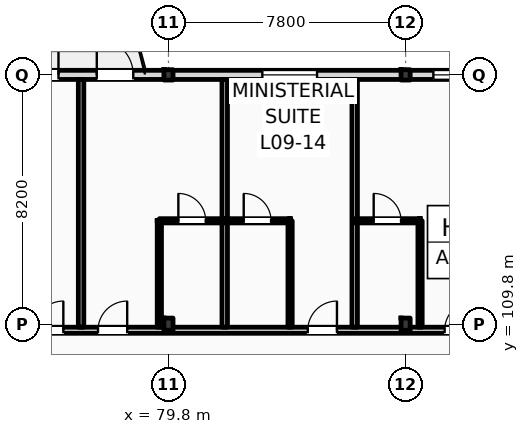
"""IFC4 building model, lengths in metres.
Left out: names, types, materials, properties, quantities, classifications, styles, units other than length and angle.
Written with IfcOpenShell. Run it as: python <this file> out.ifc"""

import sys

from ifc_helpers import new_model, si_unit, direction, frame, frame_2d, origin, origin_2d, place, context, subcontext, project, spatial, rectangle, i_section, extrude, element, fill, save


model = new_model("IFC4")
c1 = context("Model", 3, precision=1e-05, world=origin(), true_north=direction((0.0, 1.0)))
c2 = subcontext(c1, "Body", "Model", "MODEL_VIEW")
j1 = project(units=[si_unit("LENGTHUNIT", "METRE"), si_unit("PLANEANGLEUNIT", "RADIAN")], contexts=[c1])
p1 = place(None, origin())
s1 = spatial("IfcSite", under=j1, at=p1, CompositionType="ELEMENT")
p2 = place(p1, origin())
s2 = spatial("IfcBuilding", under=s1, at=p2, CompositionType="ELEMENT")
p3 = place(p2, frame((0.0, 0.0, 39.0)))
s3 = spatial("IfcBuildingStorey", under=s2, at=p3, CompositionType="ELEMENT", Elevation=39.0)
p4 = place(p3, frame((79.8, 109.8, 0.0), z_axis=(0.0, 0.0, 1.0), x_axis=(1.0, 0.0, 0.0)))
e1 = element("IfcColumn", 1, at=p4, inside=s3, PredefinedType="COLUMN", context=c2, shape_type="SweptSolid", body=[
    extrude(i_section(OverallWidth=0.3, OverallDepth=0.4, WebThickness=0.013, FlangeThickness=0.024, FilletRadius=0.027, at=origin_2d()), origin(), (0.0, 0.0, 1.0), 3.6),
])
p5 = place(p3, frame((79.8, 118.0, 0.0), z_axis=(0.0, 0.0, 1.0), x_axis=(1.0, 0.0, 0.0)))
e2 = element("IfcColumn", 2, at=p5, inside=s3, PredefinedType="COLUMN", context=c2, shape_type="SweptSolid", body=[
    extrude(i_section(OverallWidth=0.3, OverallDepth=0.34, WebThickness=0.012, FlangeThickness=0.021, FilletRadius=0.027, at=origin_2d()), origin(), (0.0, 0.0, 1.0), 3.6),
])
p6 = place(p3, frame((87.6, 109.8, 0.0), z_axis=(0.0, 0.0, 1.0), x_axis=(1.0, 0.0, 0.0)))
e3 = element("IfcColumn", 3, at=p6, inside=s3, PredefinedType="COLUMN", context=c2, shape_type="SweptSolid", body=[
    extrude(i_section(OverallWidth=0.3, OverallDepth=0.4, WebThickness=0.013, FlangeThickness=0.024, FilletRadius=0.027, at=origin_2d()), origin(), (0.0, 0.0, 1.0), 3.6),
])
p7 = place(p3, frame((87.6, 118.0, 0.0), z_axis=(0.0, 0.0, 1.0), x_axis=(1.0, 0.0, 0.0)))
e4 = element("IfcColumn", 4, at=p7, inside=s3, PredefinedType="COLUMN", context=c2, shape_type="SweptSolid", body=[
    extrude(i_section(OverallWidth=0.3, OverallDepth=0.34, WebThickness=0.012, FlangeThickness=0.021, FilletRadius=0.027, at=origin_2d()), origin(), (0.0, 0.0, 1.0), 3.6),
])
p8 = place(p3, frame((22.5, 118.0, 0.0), z_axis=(0.0, 0.0, 1.0), x_axis=(1.0, 0.0, 0.0)))
e5 = element("IfcWall", 5, at=p8, inside=s3, PredefinedType="STANDARD", context=c2, shape_type="SweptSolid", body=[
    extrude(rectangle(XDim=72.9, YDim=0.3, at=frame_2d((36.45, 0.0))), origin(), (0.0, 0.0, 1.0), 2.92),
])
p9 = place(p8, frame((3.6, 0.0, 0.9)))
e6 = element("IfcOpeningElement", 6, at=p9, cuts=e5, PredefinedType="OPENING", context=c2, shape_type="SweptSolid", body=[
    extrude(rectangle(XDim=1.1, YDim=1.6, at=frame_2d((0.55, 0.8))), frame((0.0, 0.16, 0.0), z_axis=(0.0, -1.0, 0.0), x_axis=(1.0, 0.0, 0.0)), (0.0, 0.0, 1.0), 0.32),
])
p10 = place(p8, frame((6.688, 0.0, 0.0)))
e7 = element("IfcOpeningElement", 7, at=p10, cuts=e5, PredefinedType="OPENING", context=c2, shape_type="SweptSolid", body=[
    extrude(rectangle(XDim=1.2, YDim=2.25, at=frame_2d((0.6, 1.125))), frame((0.0, 0.16, 0.0), z_axis=(0.0, -1.0, 0.0), x_axis=(1.0, 0.0, 0.0)), (0.0, 0.0, 1.0), 0.32),
])
p11 = place(p8, frame((11.388, 0.0, 0.9)))
e8 = element("IfcOpeningElement", 8, at=p11, cuts=e5, PredefinedType="OPENING", context=c2, shape_type="SweptSolid", body=[
    extrude(rectangle(XDim=1.6, YDim=1.75, at=frame_2d((0.8, 0.875))), frame((0.0, 0.16, 0.0), z_axis=(0.0, -1.0, 0.0), x_axis=(1.0, 0.0, 0.0)), (0.0, 0.0, 1.0), 0.32),
])
p12 = place(p8, frame((15.413, 0.0, 0.9)))
e9 = element("IfcOpeningElement", 9, at=p12, cuts=e5, PredefinedType="OPENING", context=c2, shape_type="SweptSolid", body=[
    extrude(rectangle(XDim=1.75, YDim=1.84, at=frame_2d((0.875, 0.92))), frame((0.0, 0.16, 0.0), z_axis=(0.0, -1.0, 0.0), x_axis=(1.0, 0.0, 0.0)), (0.0, 0.0, 1.0), 0.32),
])
p13 = place(p8, frame((21.245, 0.0, 0.0)))
e10 = element("IfcOpeningElement", 10, at=p13, cuts=e5, PredefinedType="OPENING", context=c2, shape_type="SweptSolid", body=[
    extrude(rectangle(XDim=1.2, YDim=2.25, at=frame_2d((0.6, 1.125))), frame((0.0, 0.16, 0.0), z_axis=(0.0, -1.0, 0.0), x_axis=(1.0, 0.0, 0.0)), (0.0, 0.0, 1.0), 0.32),
])
p14 = place(p8, frame((23.705, 0.0, 0.0)))
e11 = element("IfcOpeningElement", 11, at=p14, cuts=e5, PredefinedType="OPENING", context=c2, shape_type="SweptSolid", body=[
    extrude(rectangle(XDim=1.2, YDim=2.25, at=frame_2d((0.6, 1.125))), frame((0.0, 0.16, 0.0), z_axis=(0.0, -1.0, 0.0), x_axis=(1.0, 0.0, 0.0)), (0.0, 0.0, 1.0), 0.32),
])
p15 = place(p8, frame((28.488, 0.0, 0.9)))
e12 = element("IfcOpeningElement", 12, at=p15, cuts=e5, PredefinedType="OPENING", context=c2, shape_type="SweptSolid", body=[
    extrude(rectangle(XDim=2.6, YDim=1.84, at=frame_2d((1.3, 0.92))), frame((0.0, 0.16, 0.0), z_axis=(0.0, -1.0, 0.0), x_axis=(1.0, 0.0, 0.0)), (0.0, 0.0, 1.0), 0.32),
])
p16 = place(p8, frame((34.76, 0.0, 0.9)))
e13 = element("IfcOpeningElement", 13, at=p16, cuts=e5, PredefinedType="OPENING", context=c2, shape_type="SweptSolid", body=[
    extrude(rectangle(XDim=1.1, YDim=1.84, at=frame_2d((0.55, 0.92))), frame((0.0, 0.16, 0.0), z_axis=(0.0, -1.0, 0.0), x_axis=(1.0, 0.0, 0.0)), (0.0, 0.0, 1.0), 0.32),
])
p17 = place(p8, frame((38.143, 0.0, 0.0)))
e14 = element("IfcOpeningElement", 14, at=p17, cuts=e5, PredefinedType="OPENING", context=c2, shape_type="SweptSolid", body=[
    extrude(rectangle(XDim=1.2, YDim=2.25, at=frame_2d((0.6, 1.125))), frame((0.0, 0.16, 0.0), z_axis=(0.0, -1.0, 0.0), x_axis=(1.0, 0.0, 0.0)), (0.0, 0.0, 1.0), 0.32),
])
p18 = place(p8, frame((42.687, 0.0, 0.9)))
e15 = element("IfcOpeningElement", 15, at=p18, cuts=e5, PredefinedType="OPENING", context=c2, shape_type="SweptSolid", body=[
    extrude(rectangle(XDim=1.2, YDim=1.8, at=frame_2d((0.6, 0.9))), frame((0.0, 0.16, 0.0), z_axis=(0.0, -1.0, 0.0), x_axis=(1.0, 0.0, 0.0)), (0.0, 0.0, 1.0), 0.32),
])
p19 = place(p8, frame((47.112, 0.0, 0.9)))
e16 = element("IfcOpeningElement", 16, at=p19, cuts=e5, PredefinedType="OPENING", context=c2, shape_type="SweptSolid", body=[
    extrude(rectangle(XDim=1.35, YDim=1.84, at=frame_2d((0.675, 0.92))), frame((0.0, 0.16, 0.0), z_axis=(0.0, -1.0, 0.0), x_axis=(1.0, 0.0, 0.0)), (0.0, 0.0, 1.0), 0.32),
])
p20 = place(p8, frame((52.482, 0.0, 0.0)))
e17 = element("IfcOpeningElement", 17, at=p20, cuts=e5, PredefinedType="OPENING", context=c2, shape_type="SweptSolid", body=[
    extrude(rectangle(XDim=1.2, YDim=2.25, at=frame_2d((0.6, 1.125))), frame((0.0, 0.16, 0.0), z_axis=(0.0, -1.0, 0.0), x_axis=(1.0, 0.0, 0.0)), (0.0, 0.0, 1.0), 0.32),
])
p21 = place(p8, frame((54.942, 0.0, 0.0)))
e18 = element("IfcOpeningElement", 18, at=p21, cuts=e5, PredefinedType="OPENING", context=c2, shape_type="SweptSolid", body=[
    extrude(rectangle(XDim=1.2, YDim=2.25, at=frame_2d((0.6, 1.125))), frame((0.0, 0.16, 0.0), z_axis=(0.0, -1.0, 0.0), x_axis=(1.0, 0.0, 0.0)), (0.0, 0.0, 1.0), 0.32),
])
p22 = place(p8, frame((60.387, 0.0, 0.9)))
e19 = element("IfcOpeningElement", 19, at=p22, cuts=e5, PredefinedType="OPENING", context=c2, shape_type="SweptSolid", body=[
    extrude(rectangle(XDim=1.8, YDim=1.84, at=frame_2d((0.9, 0.92))), frame((0.0, 0.16, 0.0), z_axis=(0.0, -1.0, 0.0), x_axis=(1.0, 0.0, 0.0)), (0.0, 0.0, 1.0), 0.32),
])
p23 = place(p8, frame((66.013, 0.0, 0.9)))
e20 = element("IfcOpeningElement", 20, at=p23, cuts=e5, PredefinedType="OPENING", context=c2, shape_type="SweptSolid", body=[
    extrude(rectangle(XDim=1.35, YDim=1.84, at=frame_2d((0.675, 0.92))), frame((0.0, 0.16, 0.0), z_axis=(0.0, -1.0, 0.0), x_axis=(1.0, 0.0, 0.0)), (0.0, 0.0, 1.0), 0.32),
])
p24 = place(p8, frame((69.275, 0.0, 0.9)))
e21 = element("IfcOpeningElement", 21, at=p24, cuts=e5, PredefinedType="OPENING", context=c2, shape_type="SweptSolid", body=[
    extrude(rectangle(XDim=2.1, YDim=1.84, at=frame_2d((1.05, 0.92))), frame((0.0, 0.16, 0.0), z_axis=(0.0, -1.0, 0.0), x_axis=(1.0, 0.0, 0.0)), (0.0, 0.0, 1.0), 0.32),
])
p25 = place(p3, frame((10.65, 109.6, 0.0), z_axis=(0.0, 0.0, 1.0), x_axis=(1.0, 0.0, 0.0)))
e22 = element("IfcWall", 22, at=p25, inside=s3, PredefinedType="PARTITIONING", context=c2, shape_type="SweptSolid", body=[
    extrude(rectangle(XDim=84.61, YDim=0.2, at=frame_2d((42.305, 0.0))), origin(), (0.0, 0.0, 1.0), 2.82),
])
p26 = place(p25, frame((15.49, 0.0, 0.0)))
e23 = element("IfcOpeningElement", 23, at=p26, cuts=e22, PredefinedType="OPENING", context=c2, shape_type="SweptSolid", body=[
    extrude(rectangle(XDim=1.02, YDim=2.2, at=frame_2d((0.51, 1.1))), frame((0.0, 0.11, 0.0), z_axis=(0.0, -1.0, 0.0), x_axis=(1.0, 0.0, 0.0)), (0.0, 0.0, 1.0), 0.22),
])
p27 = place(p25, frame((19.703, 0.0, 0.0)))
e24 = element("IfcOpeningElement", 24, at=p27, cuts=e22, PredefinedType="OPENING", context=c2, shape_type="SweptSolid", body=[
    extrude(rectangle(XDim=1.02, YDim=2.2, at=frame_2d((0.51, 1.1))), frame((0.0, 0.11, 0.0), z_axis=(0.0, -1.0, 0.0), x_axis=(1.0, 0.0, 0.0)), (0.0, 0.0, 1.0), 0.22),
])
p28 = place(p25, frame((24.203, 0.0, 0.0)))
e25 = element("IfcOpeningElement", 25, at=p28, cuts=e22, PredefinedType="OPENING", context=c2, shape_type="SweptSolid", body=[
    extrude(rectangle(XDim=1.02, YDim=2.2, at=frame_2d((0.51, 1.1))), frame((0.0, 0.11, 0.0), z_axis=(0.0, -1.0, 0.0), x_axis=(1.0, 0.0, 0.0)), (0.0, 0.0, 1.0), 0.22),
])
p29 = place(p25, frame((26.552, 0.0, 0.0)))
e26 = element("IfcOpeningElement", 26, at=p29, cuts=e22, PredefinedType="OPENING", context=c2, shape_type="SweptSolid", body=[
    extrude(rectangle(XDim=1.02, YDim=2.2, at=frame_2d((0.51, 1.1))), frame((0.0, 0.11, 0.0), z_axis=(0.0, -1.0, 0.0), x_axis=(1.0, 0.0, 0.0)), (0.0, 0.0, 1.0), 0.22),
])
p30 = place(p25, frame((33.233, 0.0, 0.0)))
e27 = element("IfcOpeningElement", 27, at=p30, cuts=e22, PredefinedType="OPENING", context=c2, shape_type="SweptSolid", body=[
    extrude(rectangle(XDim=0.96, YDim=2.2, at=frame_2d((0.48, 1.1))), frame((0.0, 0.11, 0.0), z_axis=(0.0, -1.0, 0.0), x_axis=(1.0, 0.0, 0.0)), (0.0, 0.0, 1.0), 0.22),
])
p31 = place(p25, frame((35.583, 0.0, 0.0)))
e28 = element("IfcOpeningElement", 28, at=p31, cuts=e22, PredefinedType="OPENING", context=c2, shape_type="SweptSolid", body=[
    extrude(rectangle(XDim=0.96, YDim=2.2, at=frame_2d((0.48, 1.1))), frame((0.0, 0.11, 0.0), z_axis=(0.0, -1.0, 0.0), x_axis=(1.0, 0.0, 0.0)), (0.0, 0.0, 1.0), 0.22),
])
p32 = place(p25, frame((42.233, 0.0, 0.0)))
e29 = element("IfcOpeningElement", 29, at=p32, cuts=e22, PredefinedType="OPENING", context=c2, shape_type="SweptSolid", body=[
    extrude(rectangle(XDim=0.96, YDim=2.2, at=frame_2d((0.48, 1.1))), frame((0.0, 0.11, 0.0), z_axis=(0.0, -1.0, 0.0), x_axis=(1.0, 0.0, 0.0)), (0.0, 0.0, 1.0), 0.22),
])
p33 = place(p25, frame((46.983, 0.0, 0.0)))
e30 = element("IfcOpeningElement", 30, at=p33, cuts=e22, PredefinedType="OPENING", context=c2, shape_type="SweptSolid", body=[
    extrude(rectangle(XDim=0.96, YDim=2.2, at=frame_2d((0.48, 1.1))), frame((0.0, 0.11, 0.0), z_axis=(0.0, -1.0, 0.0), x_axis=(1.0, 0.0, 0.0)), (0.0, 0.0, 1.0), 0.22),
])
p34 = place(p25, frame((51.233, 0.0, 0.0)))
e31 = element("IfcOpeningElement", 31, at=p34, cuts=e22, PredefinedType="OPENING", context=c2, shape_type="SweptSolid", body=[
    extrude(rectangle(XDim=0.96, YDim=2.2, at=frame_2d((0.48, 1.1))), frame((0.0, 0.11, 0.0), z_axis=(0.0, -1.0, 0.0), x_axis=(1.0, 0.0, 0.0)), (0.0, 0.0, 1.0), 0.22),
])
p35 = place(p25, frame((55.733, 0.0, 0.0)))
e32 = element("IfcOpeningElement", 32, at=p35, cuts=e22, PredefinedType="OPENING", context=c2, shape_type="SweptSolid", body=[
    extrude(rectangle(XDim=0.96, YDim=2.2, at=frame_2d((0.48, 1.1))), frame((0.0, 0.11, 0.0), z_axis=(0.0, -1.0, 0.0), x_axis=(1.0, 0.0, 0.0)), (0.0, 0.0, 1.0), 0.22),
])
p36 = place(p25, frame((58.083, 0.0, 0.0)))
e33 = element("IfcOpeningElement", 33, at=p36, cuts=e22, PredefinedType="OPENING", context=c2, shape_type="SweptSolid", body=[
    extrude(rectangle(XDim=0.96, YDim=2.2, at=frame_2d((0.48, 1.1))), frame((0.0, 0.11, 0.0), z_axis=(0.0, -1.0, 0.0), x_axis=(1.0, 0.0, 0.0)), (0.0, 0.0, 1.0), 0.22),
])
p37 = place(p25, frame((64.732, 0.0, 0.0)))
e34 = element("IfcOpeningElement", 34, at=p37, cuts=e22, PredefinedType="OPENING", context=c2, shape_type="SweptSolid", body=[
    extrude(rectangle(XDim=0.96, YDim=2.2, at=frame_2d((0.48, 1.1))), frame((0.0, 0.11, 0.0), z_axis=(0.0, -1.0, 0.0), x_axis=(1.0, 0.0, 0.0)), (0.0, 0.0, 1.0), 0.22),
])
p38 = place(p25, frame((66.832, 0.0, 0.0)))
e35 = element("IfcOpeningElement", 35, at=p38, cuts=e22, PredefinedType="OPENING", context=c2, shape_type="SweptSolid", body=[
    extrude(rectangle(XDim=0.96, YDim=2.2, at=frame_2d((0.48, 1.1))), frame((0.0, 0.11, 0.0), z_axis=(0.0, -1.0, 0.0), x_axis=(1.0, 0.0, 0.0)), (0.0, 0.0, 1.0), 0.22),
])
p39 = place(p25, frame((73.732, 0.0, 0.0)))
e36 = element("IfcOpeningElement", 36, at=p39, cuts=e22, PredefinedType="OPENING", context=c2, shape_type="SweptSolid", body=[
    extrude(rectangle(XDim=0.96, YDim=2.2, at=frame_2d((0.48, 1.1))), frame((0.0, 0.11, 0.0), z_axis=(0.0, -1.0, 0.0), x_axis=(1.0, 0.0, 0.0)), (0.0, 0.0, 1.0), 0.22),
])
p40 = place(p25, frame((78.233, 0.0, 0.0)))
e37 = element("IfcOpeningElement", 37, at=p40, cuts=e22, PredefinedType="OPENING", context=c2, shape_type="SweptSolid", body=[
    extrude(rectangle(XDim=0.96, YDim=2.2, at=frame_2d((0.48, 1.1))), frame((0.0, 0.11, 0.0), z_axis=(0.0, -1.0, 0.0), x_axis=(1.0, 0.0, 0.0)), (0.0, 0.0, 1.0), 0.22),
])
p41 = place(p25, frame((80.62, 0.0, 0.0)))
e38 = element("IfcOpeningElement", 38, at=p41, cuts=e22, PredefinedType="OPENING", context=c2, shape_type="SweptSolid", body=[
    extrude(rectangle(XDim=0.96, YDim=2.2, at=frame_2d((0.48, 1.1))), frame((0.0, 0.11, 0.0), z_axis=(0.0, -1.0, 0.0), x_axis=(1.0, 0.0, 0.0)), (0.0, 0.0, 1.0), 0.22),
])
p42 = place(p25, frame((2.716, 0.0, 0.0)))
e39 = element("IfcOpeningElement", 39, at=p42, cuts=e22, PredefinedType="OPENING", context=c2, shape_type="SweptSolid", body=[
    extrude(rectangle(XDim=1.35, YDim=2.25, at=frame_2d((0.675, 1.125))), frame((0.0, 0.11, 0.0), z_axis=(0.0, -1.0, 0.0), x_axis=(1.0, 0.0, 0.0)), (0.0, 0.0, 1.0), 0.22),
])
p43 = place(p25, frame((6.65, 0.0, 0.0)))
e40 = element("IfcOpeningElement", 40, at=p43, cuts=e22, PredefinedType="OPENING", context=c2, shape_type="SweptSolid", body=[
    extrude(rectangle(XDim=1.35, YDim=2.25, at=frame_2d((0.675, 1.125))), frame((0.0, 0.11, 0.0), z_axis=(0.0, -1.0, 0.0), x_axis=(1.0, 0.0, 0.0)), (0.0, 0.0, 1.0), 0.22),
])
p44 = place(p25, frame((10.583, 0.0, 0.0)))
e41 = element("IfcOpeningElement", 41, at=p44, cuts=e22, PredefinedType="OPENING", context=c2, shape_type="SweptSolid", body=[
    extrude(rectangle(XDim=1.35, YDim=2.25, at=frame_2d((0.675, 1.125))), frame((0.0, 0.11, 0.0), z_axis=(0.0, -1.0, 0.0), x_axis=(1.0, 0.0, 0.0)), (0.0, 0.0, 1.0), 0.22),
])
for number, where, z_axis, x_axis in (
    (42, (76.925, 109.7, 0.0), (0.0, 0.0, 1.0), (0.0, 1.0, 0.0)),
    (43, (81.65, 109.7, 0.0), (0.0, 0.0, 1.0), (0.0, 1.0, 0.0)),
):
    element("IfcWall", number, at=place(p3, frame(where, z_axis=z_axis, x_axis=x_axis)), inside=s3, PredefinedType="PARTITIONING", context=c2, shape_type="SweptSolid", body=[
        extrude(rectangle(XDim=8.15, YDim=0.18, at=frame_2d((4.075, 0.0))), origin(), (0.0, 0.0, 1.0), 3.38),
    ])
p45 = place(p3, frame((79.5, 109.7, 0.0), z_axis=(0.0, 0.0, 1.0), x_axis=(0.0, 1.0, 0.0)))
e44 = element("IfcWall", 44, at=p45, inside=s3, PredefinedType="PARTITIONING", context=c2, shape_type="SweptSolid", body=[
    extrude(rectangle(XDim=3.5, YDim=0.14, at=frame_2d((1.75, 0.0))), origin(), (0.0, 0.0, 1.0), 3.38),
])
p46 = place(p3, frame((79.5, 113.2, 0.0), z_axis=(0.0, 0.0, 1.0), x_axis=(1.0, 0.0, 0.0)))
e45 = element("IfcWall", 45, at=p46, inside=s3, PredefinedType="PARTITIONING", context=c2, shape_type="SweptSolid", body=[
    extrude(rectangle(XDim=2.15, YDim=0.14, at=frame_2d((1.075, 0.0))), origin(), (0.0, 0.0, 1.0), 3.38),
])
p47 = place(p46, frame((0.625, 0.0, 0.0)))
e46 = element("IfcOpeningElement", 46, at=p47, cuts=e45, PredefinedType="OPENING", context=c2, shape_type="SweptSolid", body=[
    extrude(rectangle(XDim=0.9, YDim=2.1, at=frame_2d((0.45, 1.05))), frame((0.0, 0.08, 0.0), z_axis=(0.0, -1.0, 0.0), x_axis=(1.0, 0.0, 0.0)), (0.0, 0.0, 1.0), 0.16),
])
p48 = place(p3, frame((85.925, 109.7, 0.0), z_axis=(0.0, 0.0, 1.0), x_axis=(0.0, 1.0, 0.0)))
e47 = element("IfcWall", 47, at=p48, inside=s3, PredefinedType="PARTITIONING", context=c2, shape_type="SweptSolid", body=[
    extrude(rectangle(XDim=8.15, YDim=0.18, at=frame_2d((4.075, 0.0))), origin(), (0.0, 0.0, 1.0), 3.38),
])
p49 = place(p3, frame((83.8, 109.7, 0.0), z_axis=(0.0, 0.0, 1.0), x_axis=(0.0, 1.0, 0.0)))
e48 = element("IfcWall", 48, at=p49, inside=s3, PredefinedType="PARTITIONING", context=c2, shape_type="SweptSolid", body=[
    extrude(rectangle(XDim=3.5, YDim=0.14, at=frame_2d((1.75, 0.0))), origin(), (0.0, 0.0, 1.0), 3.38),
])
p50 = place(p3, frame((81.65, 113.2, 0.0), z_axis=(0.0, 0.0, 1.0), x_axis=(1.0, 0.0, 0.0)))
e49 = element("IfcWall", 49, at=p50, inside=s3, PredefinedType="PARTITIONING", context=c2, shape_type="SweptSolid", body=[
    extrude(rectangle(XDim=2.15, YDim=0.14, at=frame_2d((1.075, 0.0))), origin(), (0.0, 0.0, 1.0), 3.38),
])
p51 = place(p50, frame((0.625, 0.0, 0.0)))
e50 = element("IfcOpeningElement", 50, at=p51, cuts=e49, PredefinedType="OPENING", context=c2, shape_type="SweptSolid", body=[
    extrude(rectangle(XDim=0.9, YDim=2.1, at=frame_2d((0.45, 1.05))), frame((0.0, 0.08, 0.0), z_axis=(0.0, -1.0, 0.0), x_axis=(1.0, 0.0, 0.0)), (0.0, 0.0, 1.0), 0.16),
])
p52 = place(p3, frame((88.075, 109.7, 0.0), z_axis=(0.0, 0.0, 1.0), x_axis=(0.0, 1.0, 0.0)))
e51 = element("IfcWall", 51, at=p52, inside=s3, PredefinedType="PARTITIONING", context=c2, shape_type="SweptSolid", body=[
    extrude(rectangle(XDim=3.5, YDim=0.14, at=frame_2d((1.75, 0.0))), origin(), (0.0, 0.0, 1.0), 3.38),
])
p53 = place(p3, frame((85.925, 113.2, 0.0), z_axis=(0.0, 0.0, 1.0), x_axis=(1.0, 0.0, 0.0)))
e52 = element("IfcWall", 52, at=p53, inside=s3, PredefinedType="PARTITIONING", context=c2, shape_type="SweptSolid", body=[
    extrude(rectangle(XDim=2.15, YDim=0.14, at=frame_2d((1.075, 0.0))), origin(), (0.0, 0.0, 1.0), 3.38),
])
p54 = place(p53, frame((0.625, 0.0, 0.0)))
e53 = element("IfcOpeningElement", 53, at=p54, cuts=e52, PredefinedType="OPENING", context=c2, shape_type="SweptSolid", body=[
    extrude(rectangle(XDim=0.9, YDim=2.1, at=frame_2d((0.45, 1.05))), frame((0.0, 0.08, 0.0), z_axis=(0.0, -1.0, 0.0), x_axis=(1.0, 0.0, 0.0)), (0.0, 0.0, 1.0), 0.16),
])
p55 = place(p20, origin())
e54 = element("IfcDoor", 54, at=p55, inside=s3, OperationType="SINGLE_SWING_RIGHT", PredefinedType="DOOR", context=c2, shape_type="SweptSolid", body=[
    extrude(rectangle(XDim=1.2, YDim=2.25, at=frame_2d((0.6, 1.125))), frame((0.0, 0.025, 0.0), z_axis=(0.0, -1.0, 0.0), x_axis=(1.0, 0.0, 0.0)), (0.0, 0.0, 1.0), 0.05),
])
fill(e17, e54)
p56 = place(p21, origin())
e55 = element("IfcDoor", 55, at=p56, inside=s3, OperationType="SINGLE_SWING_LEFT", PredefinedType="DOOR", context=c2, shape_type="SweptSolid", body=[
    extrude(rectangle(XDim=1.2, YDim=2.25, at=frame_2d((0.6, 1.125))), frame((0.0, 0.025, 0.0), z_axis=(0.0, -1.0, 0.0), x_axis=(1.0, 0.0, 0.0)), (0.0, 0.0, 1.0), 0.05),
])
fill(e18, e55)
p57 = place(p22, origin())
e56 = element("IfcWindow", 56, at=p57, inside=s3, PartitioningType="DOUBLE_PANEL_VERTICAL", PredefinedType="WINDOW", context=c2, shape_type="SweptSolid", body=[
    extrude(rectangle(XDim=1.8, YDim=1.84, at=frame_2d((0.9, 0.92))), frame((0.0, 0.03, 0.0), z_axis=(0.0, -1.0, 0.0), x_axis=(1.0, 0.0, 0.0)), (0.0, 0.0, 1.0), 0.06),
])
fill(e19, e56)
p58 = place(p23, origin())
e57 = element("IfcWindow", 57, at=p58, inside=s3, PartitioningType="DOUBLE_PANEL_VERTICAL", PredefinedType="WINDOW", context=c2, shape_type="SweptSolid", body=[
    extrude(rectangle(XDim=1.35, YDim=1.84, at=frame_2d((0.675, 0.92))), frame((0.0, 0.03, 0.0), z_axis=(0.0, -1.0, 0.0), x_axis=(1.0, 0.0, 0.0)), (0.0, 0.0, 1.0), 0.06),
])
fill(e20, e57)
p59 = place(p37, origin())
e58 = element("IfcDoor", 58, at=p59, inside=s3, OperationType="SINGLE_SWING_RIGHT", PredefinedType="DOOR", context=c2, shape_type="SweptSolid", body=[
    extrude(rectangle(XDim=0.96, YDim=2.2, at=frame_2d((0.48, 1.1))), frame((0.0, 0.025, 0.0), z_axis=(0.0, -1.0, 0.0), x_axis=(1.0, 0.0, 0.0)), (0.0, 0.0, 1.0), 0.05),
])
fill(e34, e58)
p60 = place(p38, origin())
e59 = element("IfcDoor", 59, at=p60, inside=s3, OperationType="SINGLE_SWING_RIGHT", PredefinedType="DOOR", context=c2, shape_type="SweptSolid", body=[
    extrude(rectangle(XDim=0.96, YDim=2.2, at=frame_2d((0.48, 1.1))), frame((0.0, 0.025, 0.0), z_axis=(0.0, -1.0, 0.0), x_axis=(1.0, 0.0, 0.0)), (0.0, 0.0, 1.0), 0.05),
])
fill(e35, e59)
p61 = place(p47, origin())
e60 = element("IfcDoor", 60, at=p61, inside=s3, OperationType="SINGLE_SWING_LEFT", PredefinedType="DOOR", context=c2, shape_type="SweptSolid", body=[
    extrude(rectangle(XDim=0.9, YDim=2.1, at=frame_2d((0.45, 1.05))), frame((0.0, 0.025, 0.0), z_axis=(0.0, -1.0, 0.0), x_axis=(1.0, 0.0, 0.0)), (0.0, 0.0, 1.0), 0.05),
])
fill(e46, e60)
p62 = place(p39, origin())
e61 = element("IfcDoor", 61, at=p62, inside=s3, OperationType="SINGLE_SWING_RIGHT", PredefinedType="DOOR", context=c2, shape_type="SweptSolid", body=[
    extrude(rectangle(XDim=0.96, YDim=2.2, at=frame_2d((0.48, 1.1))), frame((0.0, 0.025, 0.0), z_axis=(0.0, -1.0, 0.0), x_axis=(1.0, 0.0, 0.0)), (0.0, 0.0, 1.0), 0.05),
])
fill(e36, e61)
p63 = place(p51, origin())
e62 = element("IfcDoor", 62, at=p63, inside=s3, OperationType="SINGLE_SWING_LEFT", PredefinedType="DOOR", context=c2, shape_type="SweptSolid", body=[
    extrude(rectangle(XDim=0.9, YDim=2.1, at=frame_2d((0.45, 1.05))), frame((0.0, 0.025, 0.0), z_axis=(0.0, -1.0, 0.0), x_axis=(1.0, 0.0, 0.0)), (0.0, 0.0, 1.0), 0.05),
])
fill(e50, e62)
p64 = place(p40, origin())
e63 = element("IfcDoor", 63, at=p64, inside=s3, OperationType="SINGLE_SWING_RIGHT", PredefinedType="DOOR", context=c2, shape_type="SweptSolid", body=[
    extrude(rectangle(XDim=0.96, YDim=2.2, at=frame_2d((0.48, 1.1))), frame((0.0, 0.025, 0.0), z_axis=(0.0, -1.0, 0.0), x_axis=(1.0, 0.0, 0.0)), (0.0, 0.0, 1.0), 0.05),
])
fill(e37, e63)
p65 = place(p54, origin())
e64 = element("IfcDoor", 64, at=p65, inside=s3, OperationType="SINGLE_SWING_LEFT", PredefinedType="DOOR", context=c2, shape_type="SweptSolid", body=[
    extrude(rectangle(XDim=0.9, YDim=2.1, at=frame_2d((0.45, 1.05))), frame((0.0, 0.025, 0.0), z_axis=(0.0, -1.0, 0.0), x_axis=(1.0, 0.0, 0.0)), (0.0, 0.0, 1.0), 0.05),
])
fill(e53, e64)
save(model, sys.argv[1])
